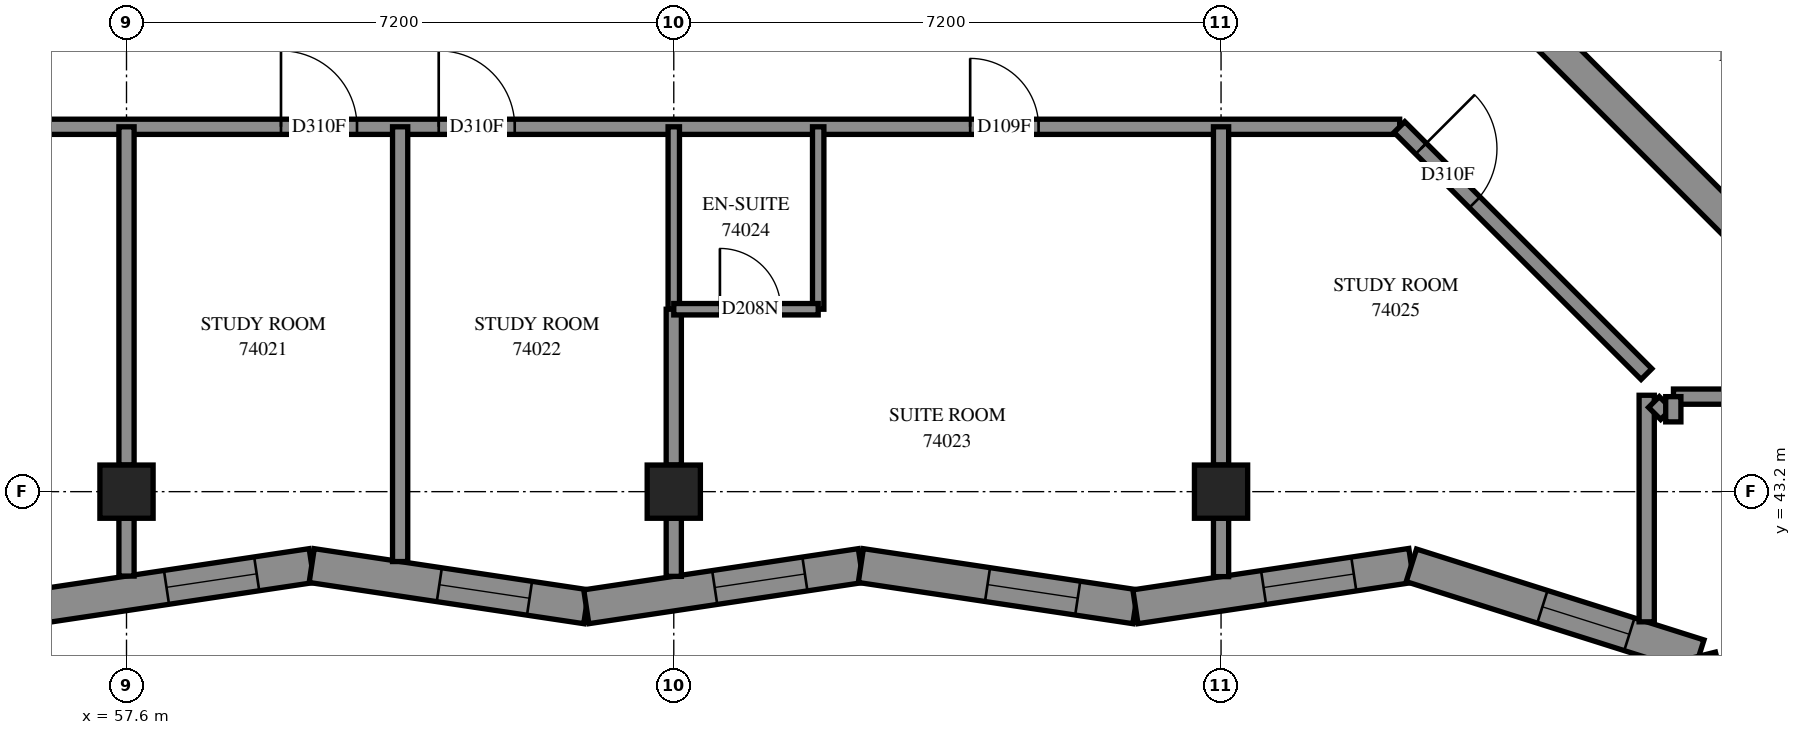
"""IFC4 building model, lengths in metres.
Left out: names, types, materials, properties, quantities, classifications, styles, units other than length and angle.
Written with IfcOpenShell. Run it as: python <this file> out.ifc"""

import sys

from ifc_helpers import new_model, si_unit, direction, frame, frame_2d, origin, origin_2d, place, context, subcontext, project, spatial, polyline, rectangle, outline, extrude, element, fill, save


model = new_model("IFC4")
c1 = context("Model", 3, precision=1e-05, world=origin(), true_north=direction((0.0, 1.0)))
c2 = subcontext(c1, "Body", "Model", "MODEL_VIEW")
j1 = project(units=[si_unit("LENGTHUNIT", "METRE"), si_unit("PLANEANGLEUNIT", "RADIAN")], contexts=[c1])
p1 = place(None, origin())
s1 = spatial("IfcSite", under=j1, at=p1, CompositionType="ELEMENT")
p2 = place(p1, origin())
s2 = spatial("IfcBuilding", under=s1, at=p2, CompositionType="ELEMENT")
p3 = place(p2, frame((0.0, 0.0, 271.0)))
s3 = spatial("IfcBuildingStorey", under=s2, at=p3, CompositionType="ELEMENT", Elevation=271.0)
for number, where, z_axis, x_axis in (
    (1, (57.6, 43.2, 0.0), (0.0, 0.0, 1.0), (1.0, 0.0, 0.0)),
    (2, (64.8, 43.2, 0.0), (0.0, 0.0, 1.0), (1.0, 0.0, 0.0)),
    (3, (72.0, 43.2, 0.0), (0.0, 0.0, 1.0), (1.0, 0.0, 0.0)),
):
    element("IfcColumn", number, at=place(p3, frame(where, z_axis=z_axis, x_axis=x_axis)), inside=s3, PredefinedType="COLUMN", context=c2, shape_type="SweptSolid", body=[
        extrude(rectangle(XDim=0.7, YDim=0.7, at=origin_2d()), origin(), (0.0, 0.0, 1.0), 3.1),
    ])
p4 = place(p3, frame((76.23, 49.231, -0.3), z_axis=(0.0, 0.0, 1.0), x_axis=(0.7071034917, -0.7071100706, 0.0)))
e4 = element("IfcWall", 4, at=p4, inside=s3, PredefinedType="SHEAR", context=c2, shape_type="SweptSolid", body=[
    extrude(rectangle(XDim=15.2, YDim=0.4, at=frame_2d((7.6, 0.0))), origin(), (0.0, 0.0, 1.0), 2.7),
])
p5 = place(p3, frame((56.425, 41.685, 0.0), z_axis=(0.0, 0.0, 1.0), x_axis=(0.9889295242, 0.1483859704, 0.0)))
e5 = element("IfcWall", 5, at=p5, inside=s3, PredefinedType="SOLIDWALL", context=c2, shape_type="SweptSolid", body=[
    extrude(outline(polyline([(-0.034, -0.225), (3.619, -0.225), (3.686, 0.225), (0.034, 0.225), (-0.034, -0.225)])), origin(), (0.0, 0.0, 1.0), 3.1),
])
p6 = place(p5, frame((1.721, 0.0, 0.45)))
e6 = element("IfcOpeningElement", 6, at=p6, cuts=e5, PredefinedType="OPENING", context=c2, shape_type="SweptSolid", body=[
    extrude(rectangle(XDim=1.2, YDim=2.55, at=frame_2d((0.6, 1.275))), frame((0.0, 0.235, 0.0), z_axis=(0.0, -1.0, 0.0), x_axis=(1.0, 0.0, 0.0)), (0.0, 0.0, 1.0), 0.47),
])
p7 = place(p3, frame((60.037, 42.227, 0.0), z_axis=(0.0, 0.0, 1.0), x_axis=(0.9889295242, -0.1483859704, 0.0)))
e7 = element("IfcWall", 7, at=p7, inside=s3, PredefinedType="SOLIDWALL", context=c2, shape_type="SweptSolid", body=[
    extrude(outline(polyline([(0.034, -0.225), (3.686, -0.225), (3.619, 0.225), (-0.034, 0.225), (0.034, -0.225)])), origin(), (0.0, 0.0, 1.0), 3.1),
])
p8 = place(p7, frame((1.698, 0.0, 0.45)))
e8 = element("IfcOpeningElement", 8, at=p8, cuts=e7, PredefinedType="OPENING", context=c2, shape_type="SweptSolid", body=[
    extrude(rectangle(XDim=1.2, YDim=2.55, at=frame_2d((0.6, 1.275))), frame((0.0, 0.235, 0.0), z_axis=(0.0, -1.0, 0.0), x_axis=(1.0, 0.0, 0.0)), (0.0, 0.0, 1.0), 0.47),
])
p9 = place(p3, frame((63.649, 41.685, 0.0), z_axis=(0.0, 0.0, 1.0), x_axis=(0.988930127, 0.148381953, 0.0)))
e9 = element("IfcWall", 9, at=p9, inside=s3, PredefinedType="SOLIDWALL", context=c2, shape_type="SweptSolid", body=[
    extrude(outline(polyline([(-0.034, -0.225), (3.619, -0.225), (3.686, 0.225), (0.034, 0.225), (-0.034, -0.225)])), origin(), (0.0, 0.0, 1.0), 3.1),
])
p10 = place(p9, frame((1.708, 0.0, 0.45)))
e10 = element("IfcOpeningElement", 10, at=p10, cuts=e9, PredefinedType="OPENING", context=c2, shape_type="SweptSolid", body=[
    extrude(rectangle(XDim=1.2, YDim=2.55, at=frame_2d((0.6, 1.275))), frame((0.0, 0.235, 0.0), z_axis=(0.0, -1.0, 0.0), x_axis=(1.0, 0.0, 0.0)), (0.0, 0.0, 1.0), 0.47),
])
p11 = place(p3, frame((67.261, 42.227, 0.0), z_axis=(0.0, 0.0, 1.0), x_axis=(0.9889295242, -0.1483859704, 0.0)))
e11 = element("IfcWall", 11, at=p11, inside=s3, PredefinedType="SOLIDWALL", context=c2, shape_type="SweptSolid", body=[
    extrude(outline(polyline([(0.034, -0.225), (3.686, -0.225), (3.619, 0.225), (-0.034, 0.225), (0.034, -0.225)])), origin(), (0.0, 0.0, 1.0), 3.1),
])
p12 = place(p11, frame((1.685, 0.0, 0.45)))
e12 = element("IfcOpeningElement", 12, at=p12, cuts=e11, PredefinedType="OPENING", context=c2, shape_type="SweptSolid", body=[
    extrude(rectangle(XDim=1.2, YDim=2.55, at=frame_2d((0.6, 1.275))), frame((0.0, 0.235, 0.0), z_axis=(0.0, -1.0, 0.0), x_axis=(1.0, 0.0, 0.0)), (0.0, 0.0, 1.0), 0.47),
])
p13 = place(p3, frame((70.873, 41.685, 0.0), z_axis=(0.0, 0.0, 1.0), x_axis=(0.9889307576, 0.14837775, 0.0)))
e13 = element("IfcWall", 13, at=p13, inside=s3, PredefinedType="SOLIDWALL", context=c2, shape_type="SweptSolid", body=[
    extrude(outline(polyline([(-0.034, -0.225), (3.619, -0.225), (3.723, 0.225), (0.034, 0.225), (-0.034, -0.225)])), origin(), (0.0, 0.0, 1.0), 3.1),
])
p14 = place(p13, frame((1.705, 0.0, 0.45)))
e14 = element("IfcOpeningElement", 14, at=p14, cuts=e13, PredefinedType="OPENING", context=c2, shape_type="SweptSolid", body=[
    extrude(rectangle(XDim=1.2, YDim=2.55, at=frame_2d((0.6, 1.275))), frame((0.0, 0.235, 0.0), z_axis=(0.0, -1.0, 0.0), x_axis=(1.0, 0.0, 0.0)), (0.0, 0.0, 1.0), 0.47),
])
p15 = place(p3, frame((74.504, 42.23, 0.0), z_axis=(0.0, 0.0, 1.0), x_axis=(0.9534896492, -0.3014257601, 0.0)))
e15 = element("IfcWall", 15, at=p15, inside=s3, PredefinedType="SOLIDWALL", context=c2, shape_type="SweptSolid", body=[
    extrude(outline(polyline([(0.052, -0.225), (3.841, -0.225), (4.093, 0.225), (-0.052, 0.225), (0.052, -0.225)])), origin(), (0.0, 0.0, 1.0), 3.1),
])
p16 = place(p15, frame((1.808, 0.0, 0.45)))
e16 = element("IfcOpeningElement", 16, at=p16, cuts=e15, PredefinedType="OPENING", context=c2, shape_type="SweptSolid", body=[
    extrude(rectangle(XDim=1.2, YDim=2.55, at=frame_2d((0.6, 1.275))), frame((0.0, 0.235, 0.0), z_axis=(0.0, -1.0, 0.0), x_axis=(1.0, 0.0, 0.0)), (0.0, 0.0, 1.0), 0.47),
])
p17 = place(p3, frame((78.286, 41.035, 0.0), z_axis=(0.0, 0.0, 1.0), x_axis=(0.2414328965, -0.9704175166, 0.0)))
e17 = element("IfcWall", 17, at=p17, inside=s3, PredefinedType="SOLIDWALL", context=c2, shape_type="SweptSolid", body=[
    extrude(outline(polyline([(0.126, -0.225), (4.782, -0.225), (4.522, 0.225), (-0.126, 0.225), (0.126, -0.225)])), origin(), (0.0, 0.0, 1.0), 3.1),
])
p18 = place(p17, frame((2.3, 0.0, 0.45)))
e18 = element("IfcOpeningElement", 18, at=p18, cuts=e17, PredefinedType="OPENING", context=c2, shape_type="SweptSolid", body=[
    extrude(rectangle(XDim=1.2, YDim=2.55, at=frame_2d((0.6, 1.275))), frame((0.0, 0.235, 0.0), z_axis=(0.0, -1.0, 0.0), x_axis=(1.0, 0.0, 0.0)), (0.0, 0.0, 1.0), 0.47),
])
p19 = place(p3, frame((55.2, 48.0, 0.0), z_axis=(0.0, 0.0, 1.0), x_axis=(1.0, 0.0, 0.0)))
e19 = element("IfcWall", 19, at=p19, inside=s3, PredefinedType="PARTITIONING", context=c2, shape_type="SweptSolid", body=[
    extrude(rectangle(XDim=19.15, YDim=0.2, at=frame_2d((9.575, 0.0))), origin(), (0.0, 0.0, 1.0), 3.1),
])
p20 = place(p19, frame((4.433, 0.0, 0.0)))
e20 = element("IfcOpeningElement", 20, at=p20, cuts=e19, PredefinedType="OPENING", context=c2, shape_type="SweptSolid", body=[
    extrude(rectangle(XDim=1.0, YDim=2.1, at=frame_2d((0.5, 1.05))), frame((0.0, 0.11, 0.0), z_axis=(0.0, -1.0, 0.0), x_axis=(1.0, 0.0, 0.0)), (0.0, 0.0, 1.0), 0.22),
])
p21 = place(p19, frame((6.508, 0.0, 0.0)))
e21 = element("IfcOpeningElement", 21, at=p21, cuts=e19, PredefinedType="OPENING", context=c2, shape_type="SweptSolid", body=[
    extrude(rectangle(XDim=1.0, YDim=2.1, at=frame_2d((0.5, 1.05))), frame((0.0, 0.11, 0.0), z_axis=(0.0, -1.0, 0.0), x_axis=(1.0, 0.0, 0.0)), (0.0, 0.0, 1.0), 0.22),
])
p22 = place(p19, frame((13.499, 0.0, 0.0)))
e22 = element("IfcOpeningElement", 22, at=p22, cuts=e19, PredefinedType="OPENING", context=c2, shape_type="SweptSolid", body=[
    extrude(rectangle(XDim=0.9, YDim=2.1, at=frame_2d((0.45, 1.05))), frame((0.0, 0.11, 0.0), z_axis=(0.0, -1.0, 0.0), x_axis=(1.0, 0.0, 0.0)), (0.0, 0.0, 1.0), 0.22),
])
p23 = place(p3, frame((61.2, 42.281, 0.0), z_axis=(0.0, 0.0, 1.0), x_axis=(0.0, 1.0, 0.0)))
e23 = element("IfcWall", 23, at=p23, inside=s3, PredefinedType="PARTITIONING", context=c2, shape_type="SweptSolid", body=[
    extrude(rectangle(XDim=5.72, YDim=0.2, at=frame_2d((2.86, 0.0))), origin(), (0.0, 0.0, 1.0), 3.1),
])
p24 = place(p3, frame((74.347, 47.997, 0.0), z_axis=(0.0, 0.0, 1.0), x_axis=(0.7071067812, -0.7071067812, 0.0)))
e24 = element("IfcWall", 24, at=p24, inside=s3, PredefinedType="PARTITIONING", context=c2, shape_type="SweptSolid", body=[
    extrude(rectangle(XDim=4.596, YDim=0.2, at=frame_2d((2.298, 0.0))), origin(), (0.0, 0.0, 1.0), 3.1),
])
p25 = place(p24, frame((0.401, 0.0, 0.0)))
e25 = element("IfcOpeningElement", 25, at=p25, cuts=e24, PredefinedType="OPENING", context=c2, shape_type="SweptSolid", body=[
    extrude(rectangle(XDim=1.0, YDim=2.1, at=frame_2d((0.5, 1.05))), frame((0.0, 0.11, 0.0), z_axis=(0.0, -1.0, 0.0), x_axis=(1.0, 0.0, 0.0)), (0.0, 0.0, 1.0), 0.22),
])
for number, where, z_axis, x_axis in (
    (26, (57.6, 43.55, 0.0), (0.0, 0.0, 1.0), (0.0, 1.0, 0.0)),
    (27, (72.0, 43.55, 0.0), (0.0, 0.0, 1.0), (0.0, 1.0, 0.0)),
):
    element("IfcWall", number, at=place(p3, frame(where, z_axis=z_axis, x_axis=x_axis)), inside=s3, PredefinedType="PARTITIONING", context=c2, shape_type="SweptSolid", body=[
        extrude(rectangle(XDim=4.45, YDim=0.2, at=frame_2d((2.225, 0.0))), origin(), (0.0, 0.0, 1.0), 3.1),
    ])
p26 = place(p3, frame((77.6, 41.487, 0.0), z_axis=(0.0, 0.0, 1.0), x_axis=(0.0, 1.0, 0.0)))
e28 = element("IfcWall", 28, at=p26, inside=s3, PredefinedType="PARTITIONING", context=c2, shape_type="SweptSolid", body=[
    extrude(rectangle(XDim=2.981, YDim=0.2, at=frame_2d((1.49, 0.0))), origin(), (0.0, 0.0, 1.0), 3.1),
])
p27 = place(p3, frame((77.952, 44.45, 0.0), z_axis=(0.0, 0.0, 1.0), x_axis=(1.0, 0.0, 0.0)))
e29 = element("IfcWall", 29, at=p27, inside=s3, PredefinedType="PARTITIONING", context=c2, shape_type="SweptSolid", body=[
    extrude(rectangle(XDim=2.498, YDim=0.2, at=frame_2d((1.249, 0.0))), origin(), (0.0, 0.0, 1.0), 3.1),
])
for number, where, z_axis, x_axis in (
    (30, (66.7, 45.6, 0.0), (0.0, 0.0, 1.0), (0.0, 1.0, 0.0)),
    (31, (64.8, 45.6, 0.0), (0.0, 0.0, 1.0), (0.0, 1.0, 0.0)),
):
    element("IfcWall", number, at=place(p3, frame(where, z_axis=z_axis, x_axis=x_axis)), inside=s3, PredefinedType="PARTITIONING", context=c2, shape_type="SweptSolid", body=[
        extrude(rectangle(XDim=2.4, YDim=0.15, at=frame_2d((1.2, 0.0))), origin(), (0.0, 0.0, 1.0), 3.1),
    ])
p28 = place(p3, frame((64.8, 43.55, 0.0), z_axis=(0.0, 0.0, 1.0), x_axis=(0.0, 1.0, 0.0)))
e32 = element("IfcWall", 32, at=p28, inside=s3, PredefinedType="PARTITIONING", context=c2, shape_type="SweptSolid", body=[
    extrude(rectangle(XDim=2.05, YDim=0.2, at=frame_2d((1.025, 0.0))), origin(), (0.0, 0.0, 1.0), 3.1),
])
p29 = place(p3, frame((64.8, 45.6, 0.0), z_axis=(0.0, 0.0, 1.0), x_axis=(1.0, 0.0, 0.0)))
e33 = element("IfcWall", 33, at=p29, inside=s3, PredefinedType="PARTITIONING", context=c2, shape_type="SweptSolid", body=[
    extrude(rectangle(XDim=1.9, YDim=0.15, at=frame_2d((0.95, 0.0))), origin(), (0.0, 0.0, 1.0), 3.1),
])
p30 = place(p29, frame((0.607, 0.0, 0.0)))
e34 = element("IfcOpeningElement", 34, at=p30, cuts=e33, PredefinedType="OPENING", context=c2, shape_type="SweptSolid", body=[
    extrude(rectangle(XDim=0.8, YDim=2.1, at=frame_2d((0.4, 1.05))), frame((0.0, 0.085, 0.0), z_axis=(0.0, -1.0, 0.0), x_axis=(1.0, 0.0, 0.0)), (0.0, 0.0, 1.0), 0.17),
])
p31 = place(p3, frame((78.571, 40.82, 0.0), z_axis=(0.0, 0.0, 1.0), x_axis=(0.7059234937, 0.7082880918, 0.0)))
e35 = element("IfcWall", 35, at=p31, inside=s3, PredefinedType="PARTITIONING", context=c2, shape_type="SweptSolid", body=[
    extrude(rectangle(XDim=1.1, YDim=0.2, at=frame_2d((0.55, 0.0))), origin(), (0.0, 0.0, 1.0), 3.1),
])
p32 = place(p3, frame((72.0, 42.082, 0.0), z_axis=(0.0, 0.0, 1.0), x_axis=(0.0, 1.0, 0.0)))
e36 = element("IfcWall", 36, at=p32, inside=s3, PredefinedType="PARTITIONING", context=c2, shape_type="SweptSolid", body=[
    extrude(rectangle(XDim=0.768, YDim=0.2, at=frame_2d((0.384, 0.0))), origin(), (0.0, 0.0, 1.0), 3.1),
])
p33 = place(p3, frame((64.8, 42.086, 0.0), z_axis=(0.0, 0.0, 1.0), x_axis=(0.0, 1.0, 0.0)))
e37 = element("IfcWall", 37, at=p33, inside=s3, PredefinedType="PARTITIONING", context=c2, shape_type="SweptSolid", body=[
    extrude(rectangle(XDim=0.764, YDim=0.2, at=frame_2d((0.382, 0.0))), origin(), (0.0, 0.0, 1.0), 3.1),
])
p34 = place(p3, frame((57.6, 42.089, 0.0), z_axis=(0.0, 0.0, 1.0), x_axis=(0.0, 1.0, 0.0)))
e38 = element("IfcWall", 38, at=p34, inside=s3, PredefinedType="PARTITIONING", context=c2, shape_type="SweptSolid", body=[
    extrude(rectangle(XDim=0.761, YDim=0.2, at=frame_2d((0.38, 0.0))), origin(), (0.0, 0.0, 1.0), 3.1),
])
p35 = place(p3, frame((77.695, 44.38, 0.0), z_axis=(0.0, 0.0, 1.0), x_axis=(0.707329037, -0.7068844555, 0.0)))
e39 = element("IfcWall", 39, at=p35, inside=s3, PredefinedType="PARTITIONING", context=c2, shape_type="SweptSolid", body=[
    extrude(rectangle(XDim=0.225, YDim=0.2, at=frame_2d((0.112, 0.0))), origin(), (0.0, 0.0, 1.0), 3.1),
])
p36 = place(p3, frame((77.95, 44.118, 0.0), z_axis=(0.0, 0.0, 1.0), x_axis=(0.0, 1.0, 0.0)))
e40 = element("IfcWall", 40, at=p36, inside=s3, PredefinedType="PARTITIONING", context=c2, shape_type="SweptSolid", body=[
    extrude(rectangle(XDim=0.332, YDim=0.2, at=frame_2d((0.166, 0.0))), origin(), (0.0, 0.0, 1.0), 3.1),
])
p37 = place(p6, origin())
e41 = element("IfcWindow", 41, at=p37, inside=s3, PartitioningType="SINGLE_PANEL", PredefinedType="WINDOW", context=c2, shape_type="SweptSolid", body=[
    extrude(rectangle(XDim=1.2, YDim=2.55, at=frame_2d((0.6, 1.275))), frame((0.0, 0.205, 0.0), z_axis=(0.0, -1.0, 0.0), x_axis=(1.0, 0.0, 0.0)), (0.0, 0.0, 1.0), 0.06),
])
fill(e6, e41)
p38 = place(p8, origin())
e42 = element("IfcWindow", 42, at=p38, inside=s3, PartitioningType="SINGLE_PANEL", PredefinedType="WINDOW", context=c2, shape_type="SweptSolid", body=[
    extrude(rectangle(XDim=1.2, YDim=2.55, at=frame_2d((0.6, 1.275))), frame((0.0, 0.205, 0.0), z_axis=(0.0, -1.0, 0.0), x_axis=(1.0, 0.0, 0.0)), (0.0, 0.0, 1.0), 0.06),
])
fill(e8, e42)
p39 = place(p10, origin())
e43 = element("IfcWindow", 43, at=p39, inside=s3, PartitioningType="SINGLE_PANEL", PredefinedType="WINDOW", context=c2, shape_type="SweptSolid", body=[
    extrude(rectangle(XDim=1.2, YDim=2.55, at=frame_2d((0.6, 1.275))), frame((0.0, 0.205, 0.0), z_axis=(0.0, -1.0, 0.0), x_axis=(1.0, 0.0, 0.0)), (0.0, 0.0, 1.0), 0.06),
])
fill(e10, e43)
p40 = place(p12, origin())
e44 = element("IfcWindow", 44, at=p40, inside=s3, PartitioningType="SINGLE_PANEL", PredefinedType="WINDOW", context=c2, shape_type="SweptSolid", body=[
    extrude(rectangle(XDim=1.2, YDim=2.55, at=frame_2d((0.6, 1.275))), frame((0.0, 0.205, 0.0), z_axis=(0.0, -1.0, 0.0), x_axis=(1.0, 0.0, 0.0)), (0.0, 0.0, 1.0), 0.06),
])
fill(e12, e44)
p41 = place(p14, origin())
e45 = element("IfcWindow", 45, at=p41, inside=s3, PartitioningType="SINGLE_PANEL", PredefinedType="WINDOW", context=c2, shape_type="SweptSolid", body=[
    extrude(rectangle(XDim=1.2, YDim=2.55, at=frame_2d((0.6, 1.275))), frame((0.0, 0.205, 0.0), z_axis=(0.0, -1.0, 0.0), x_axis=(1.0, 0.0, 0.0)), (0.0, 0.0, 1.0), 0.06),
])
fill(e14, e45)
p42 = place(p16, origin())
e46 = element("IfcWindow", 46, at=p42, inside=s3, PartitioningType="SINGLE_PANEL", PredefinedType="WINDOW", context=c2, shape_type="SweptSolid", body=[
    extrude(rectangle(XDim=1.2, YDim=2.55, at=frame_2d((0.6, 1.275))), frame((0.0, 0.205, 0.0), z_axis=(0.0, -1.0, 0.0), x_axis=(1.0, 0.0, 0.0)), (0.0, 0.0, 1.0), 0.06),
])
fill(e16, e46)
p43 = place(p20, origin())
e47 = element("IfcDoor", 47, at=p43, inside=s3, OperationType="SINGLE_SWING_LEFT", PredefinedType="DOOR", context=c2, shape_type="SweptSolid", body=[
    extrude(rectangle(XDim=1.0, YDim=2.1, at=frame_2d((0.5, 1.05))), frame((0.0, 0.025, 0.0), z_axis=(0.0, -1.0, 0.0), x_axis=(1.0, 0.0, 0.0)), (0.0, 0.0, 1.0), 0.05),
])
fill(e20, e47)
p44 = place(p21, origin())
e48 = element("IfcDoor", 48, at=p44, inside=s3, OperationType="SINGLE_SWING_RIGHT", PredefinedType="DOOR", context=c2, shape_type="SweptSolid", body=[
    extrude(rectangle(XDim=1.0, YDim=2.1, at=frame_2d((0.5, 1.05))), frame((0.0, 0.025, 0.0), z_axis=(0.0, -1.0, 0.0), x_axis=(1.0, 0.0, 0.0)), (0.0, 0.0, 1.0), 0.05),
])
fill(e21, e48)
p45 = place(p22, origin())
e49 = element("IfcDoor", 49, at=p45, inside=s3, OperationType="SINGLE_SWING_LEFT", PredefinedType="DOOR", context=c2, shape_type="SweptSolid", body=[
    extrude(rectangle(XDim=0.9, YDim=2.1, at=frame_2d((0.45, 1.05))), frame((0.0, 0.025, 0.0), z_axis=(0.0, -1.0, 0.0), x_axis=(1.0, 0.0, 0.0)), (0.0, 0.0, 1.0), 0.05),
])
fill(e22, e49)
p46 = place(p30, origin())
e50 = element("IfcDoor", 50, at=p46, inside=s3, OperationType="SINGLE_SWING_RIGHT", PredefinedType="DOOR", context=c2, shape_type="SweptSolid", body=[
    extrude(rectangle(XDim=0.8, YDim=2.1, at=frame_2d((0.4, 1.05))), frame((0.0, 0.025, 0.0), z_axis=(0.0, -1.0, 0.0), x_axis=(1.0, 0.0, 0.0)), (0.0, 0.0, 1.0), 0.05),
])
fill(e34, e50)
p47 = place(p25, origin())
e51 = element("IfcDoor", 51, at=p47, inside=s3, OperationType="SINGLE_SWING_LEFT", PredefinedType="DOOR", context=c2, shape_type="SweptSolid", body=[
    extrude(rectangle(XDim=1.0, YDim=2.1, at=frame_2d((0.5, 1.05))), frame((0.0, 0.025, 0.0), z_axis=(0.0, -1.0, 0.0), x_axis=(1.0, 0.0, 0.0)), (0.0, 0.0, 1.0), 0.05),
])
fill(e25, e51)
save(model, sys.argv[1])
